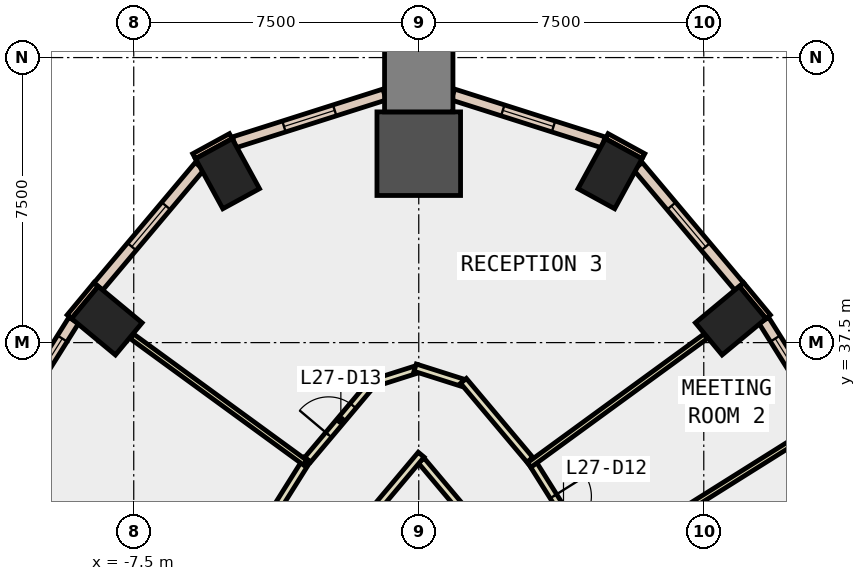
"""IFC4 building model, lengths in metres.
Left out: names, types, materials, properties, quantities, classifications, styles, units other than length and angle.
Written with IfcOpenShell. Run it as: python <this file> out.ifc"""

import sys

from ifc_helpers import new_model, si_unit, direction, frame, frame_2d, origin, origin_2d, place, context, subcontext, project, spatial, rectangle, extrude, element, fill, save


model = new_model("IFC4")
c1 = context("Model", 3, precision=1e-05, world=origin(), true_north=direction((0.0, 1.0)))
c2 = subcontext(c1, "Body", "Model", "MODEL_VIEW")
j1 = project(units=[si_unit("LENGTHUNIT", "METRE"), si_unit("PLANEANGLEUNIT", "RADIAN")], contexts=[c1])
p1 = place(None, origin())
s1 = spatial("IfcSite", under=j1, at=p1, CompositionType="ELEMENT")
p2 = place(p1, origin())
s2 = spatial("IfcBuilding", under=s1, at=p2, CompositionType="ELEMENT")
p3 = place(p2, frame((0.0, 0.0, 124.4)))
s3 = spatial("IfcBuildingStorey", under=s2, at=p3, CompositionType="ELEMENT", Elevation=124.4)
for number, where, z_axis, x_axis in (
    (1, (8.208, 38.077, -0.4), (0.0, 0.0, 1.0), (-0.638, 0.77, 0.0)),
    (2, (5.033, 41.944, -0.4), (0.0, 0.0, 1.0), (-0.877, 0.48, 0.0)),
):
    element("IfcColumn", number, at=place(p3, frame(where, z_axis=z_axis, x_axis=x_axis)), inside=s3, PredefinedType="COLUMN", context=c2, shape_type="SweptSolid", body=[
        extrude(rectangle(XDim=1.1, YDim=1.5, at=origin_2d()), origin(), (0.0, 0.0, 1.0), 4.2),
    ])
p4 = place(p3, frame((0.0, 42.471, -0.4), z_axis=(0.0, 0.0, 1.0), x_axis=(0.0, 1.0, 0.0)))
e3 = element("IfcColumn", 3, at=p4, inside=s3, PredefinedType="COLUMN", context=c2, shape_type="SweptSolid", body=[
    extrude(rectangle(XDim=2.2, YDim=2.2, at=origin_2d()), origin(), (0.0, 0.0, 1.0), 4.2),
])
for number, where, z_axis, x_axis in (
    (4, (-5.033, 41.944, -0.4), (0.0, 0.0, 1.0), (0.877, 0.48, 0.0)),
    (5, (-8.208, 38.077, -0.4), (0.0, 0.0, 1.0), (0.638, 0.77, 0.0)),
):
    element("IfcColumn", number, at=place(p3, frame(where, z_axis=z_axis, x_axis=x_axis)), inside=s3, PredefinedType="COLUMN", context=c2, shape_type="SweptSolid", body=[
        extrude(rectangle(XDim=1.1, YDim=1.5, at=origin_2d()), origin(), (0.0, 0.0, 1.0), 4.2),
    ])
p5 = place(p3, frame((0.0, 44.471, -0.4), z_axis=(0.0, 0.0, 1.0), x_axis=(0.0, 1.0, 0.0)))
e6 = element("IfcColumn", 6, at=p5, inside=s3, PredefinedType="COLUMN", context=c2, shape_type="SweptSolid", body=[
    extrude(rectangle(XDim=1.8, YDim=1.8, at=origin_2d()), origin(), (0.0, 0.0, 1.0), 4.2),
])
for number, where, z_axis, x_axis in (
    (7, (5.912, 42.404, 0.0), (0.0, 0.0, 1.0), (-0.878, 0.479, 0.0)),
    (8, (-4.946, 42.932, 0.0), (0.0, 0.0, 1.0), (-0.878, -0.479, 0.0)),
):
    element("IfcWall", number, at=place(p3, frame(where, z_axis=z_axis, x_axis=x_axis)), inside=s3, PredefinedType="STANDARD", context=c2, shape_type="SweptSolid", body=[
        extrude(rectangle(XDim=1.101, YDim=0.15, at=frame_2d((0.55, 0.0))), origin(), (0.0, 0.0, 1.0), 3.8),
    ])
for number, where, z_axis, x_axis in (
    (9, (9.194, 38.181, 0.0), (0.0, 0.0, 1.0), (-0.639, 0.77, 0.0)),
    (10, (-8.492, 39.027, 0.0), (0.0, 0.0, 1.0), (-0.639, -0.77, 0.0)),
):
    element("IfcWall", number, at=place(p3, frame(where, z_axis=z_axis, x_axis=x_axis)), inside=s3, PredefinedType="STANDARD", context=c2, shape_type="SweptSolid", body=[
        extrude(rectangle(XDim=1.1, YDim=0.15, at=frame_2d((0.55, 0.0))), origin(), (0.0, 0.0, 1.0), 3.8),
    ])
p6 = place(p3, frame((12.41, 32.779, 0.0), z_axis=(0.0, 0.0, 1.0), x_axis=(-0.53160564075, 0.846991996847, 0.0)))
e11 = element("IfcWall", 11, at=p6, inside=s3, PredefinedType="STANDARD", context=c2, shape_type="SweptSolid", body=[
    extrude(rectangle(XDim=6.266, YDim=0.3, at=frame_2d((3.133, 0.0))), origin(), (0.0, 0.0, 1.0), 3.8),
])
p7 = place(p6, frame((0.566, 0.0, 0.9)))
e12 = element("IfcOpeningElement", 12, at=p7, cuts=e11, PredefinedType="OPENING", context=c2, shape_type="SweptSolid", body=[
    extrude(rectangle(XDim=2.0, YDim=2.6, at=frame_2d((1.0, 1.3))), frame((0.0, 0.16, 0.0), z_axis=(0.0, -1.0, 0.0), x_axis=(1.0, 0.0, 0.0)), (0.0, 0.0, 1.0), 0.32),
])
p8 = place(p6, frame((3.699, 0.0, 0.9)))
e13 = element("IfcOpeningElement", 13, at=p8, cuts=e11, PredefinedType="OPENING", context=c2, shape_type="SweptSolid", body=[
    extrude(rectangle(XDim=2.0, YDim=2.6, at=frame_2d((1.0, 1.3))), frame((0.0, 0.16, 0.0), z_axis=(0.0, -1.0, 0.0), x_axis=(1.0, 0.0, 0.0)), (0.0, 0.0, 1.0), 0.32),
])
p9 = place(p3, frame((8.432, 38.976, 0.0), z_axis=(0.0, 0.0, 1.0), x_axis=(-0.643948600943, 0.765068754652, 0.0)))
e14 = element("IfcWall", 14, at=p9, inside=s3, PredefinedType="STANDARD", context=c2, shape_type="SweptSolid", body=[
    extrude(rectangle(XDim=4.138, YDim=0.3, at=frame_2d((2.069, 0.0))), origin(), (0.0, 0.0, 1.0), 3.8),
])
p10 = place(p9, frame((1.369, 0.0, 0.9)))
e15 = element("IfcOpeningElement", 15, at=p10, cuts=e14, PredefinedType="OPENING", context=c2, shape_type="SweptSolid", body=[
    extrude(rectangle(XDim=1.4, YDim=2.6, at=frame_2d((0.7, 1.3))), frame((0.0, 0.16, 0.0), z_axis=(0.0, -1.0, 0.0), x_axis=(1.0, 0.0, 0.0)), (0.0, 0.0, 1.0), 0.32),
])
p11 = place(p3, frame((4.859, 42.769, 0.0), z_axis=(0.0, 0.0, 1.0), x_axis=(-0.952992117398, 0.30299508936, 0.0)))
e16 = element("IfcWall", 16, at=p11, inside=s3, PredefinedType="STANDARD", context=c2, shape_type="SweptSolid", body=[
    extrude(rectangle(XDim=4.155, YDim=0.3, at=frame_2d((2.078, 0.0))), origin(), (0.0, 0.0, 1.0), 3.8),
])
p12 = place(p11, frame((1.378, 0.0, 0.9)))
e17 = element("IfcOpeningElement", 17, at=p12, cuts=e16, PredefinedType="OPENING", context=c2, shape_type="SweptSolid", body=[
    extrude(rectangle(XDim=1.4, YDim=2.6, at=frame_2d((0.7, 1.3))), frame((0.0, 0.16, 0.0), z_axis=(0.0, -1.0, 0.0), x_axis=(1.0, 0.0, 0.0)), (0.0, 0.0, 1.0), 0.32),
])
p13 = place(p3, frame((-0.899, 44.028, 0.0), z_axis=(0.0, 0.0, 1.0), x_axis=(-0.952992117398, -0.30299508936, 0.0)))
e18 = element("IfcWall", 18, at=p13, inside=s3, PredefinedType="STANDARD", context=c2, shape_type="SweptSolid", body=[
    extrude(rectangle(XDim=4.155, YDim=0.3, at=frame_2d((2.078, 0.0))), origin(), (0.0, 0.0, 1.0), 3.8),
])
p14 = place(p13, frame((1.378, 0.0, 0.9)))
e19 = element("IfcOpeningElement", 19, at=p14, cuts=e18, PredefinedType="OPENING", context=c2, shape_type="SweptSolid", body=[
    extrude(rectangle(XDim=1.4, YDim=2.6, at=frame_2d((0.7, 1.3))), frame((0.0, 0.16, 0.0), z_axis=(0.0, -1.0, 0.0), x_axis=(1.0, 0.0, 0.0)), (0.0, 0.0, 1.0), 0.32),
])
p15 = place(p3, frame((-5.767, 42.142, 0.0), z_axis=(0.0, 0.0, 1.0), x_axis=(-0.643948600943, -0.765068754652, 0.0)))
e20 = element("IfcWall", 20, at=p15, inside=s3, PredefinedType="STANDARD", context=c2, shape_type="SweptSolid", body=[
    extrude(rectangle(XDim=4.138, YDim=0.3, at=frame_2d((2.069, 0.0))), origin(), (0.0, 0.0, 1.0), 3.8),
])
p16 = place(p15, frame((1.369, 0.0, 0.9)))
e21 = element("IfcOpeningElement", 21, at=p16, cuts=e20, PredefinedType="OPENING", context=c2, shape_type="SweptSolid", body=[
    extrude(rectangle(XDim=1.4, YDim=2.6, at=frame_2d((0.7, 1.3))), frame((0.0, 0.16, 0.0), z_axis=(0.0, -1.0, 0.0), x_axis=(1.0, 0.0, 0.0)), (0.0, 0.0, 1.0), 0.32),
])
p17 = place(p3, frame((-9.079, 38.086, 0.0), z_axis=(0.0, 0.0, 1.0), x_axis=(-0.53160564075, -0.846991996847, 0.0)))
e22 = element("IfcWall", 22, at=p17, inside=s3, PredefinedType="STANDARD", context=c2, shape_type="SweptSolid", body=[
    extrude(rectangle(XDim=6.266, YDim=0.3, at=frame_2d((3.133, 0.0))), origin(), (0.0, 0.0, 1.0), 3.8),
])
p18 = place(p17, frame((0.566, 0.0, 0.9)))
e23 = element("IfcOpeningElement", 23, at=p18, cuts=e22, PredefinedType="OPENING", context=c2, shape_type="SweptSolid", body=[
    extrude(rectangle(XDim=2.0, YDim=2.6, at=frame_2d((1.0, 1.3))), frame((0.0, 0.16, 0.0), z_axis=(0.0, -1.0, 0.0), x_axis=(1.0, 0.0, 0.0)), (0.0, 0.0, 1.0), 0.32),
])
p19 = place(p17, frame((3.699, 0.0, 0.9)))
e24 = element("IfcOpeningElement", 24, at=p19, cuts=e22, PredefinedType="OPENING", context=c2, shape_type="SweptSolid", body=[
    extrude(rectangle(XDim=2.0, YDim=2.6, at=frame_2d((1.0, 1.3))), frame((0.0, 0.16, 0.0), z_axis=(0.0, -1.0, 0.0), x_axis=(1.0, 0.0, 0.0)), (0.0, 0.0, 1.0), 0.32),
])
p20 = place(p3, frame((1.271, 32.964, 0.0), z_axis=(0.0, 0.0, 1.0), x_axis=(-0.644007376392, 0.765019280249, 0.0)))
e25 = element("IfcWall", 25, at=p20, inside=s3, PredefinedType="PARTITIONING", context=c2, shape_type="SweptSolid", body=[
    extrude(rectangle(XDim=1.874, YDim=0.2, at=frame_2d((0.937, 0.0))), origin(), (0.0, 0.0, 1.0), 3.8),
])
p21 = place(p3, frame((0.064, 34.551, 0.0), z_axis=(0.0, 0.0, 1.0), x_axis=(-0.643638095982, -0.765329995101, 0.0)))
e26 = element("IfcWall", 26, at=p21, inside=s3, PredefinedType="PARTITIONING", context=c2, shape_type="SweptSolid", body=[
    extrude(rectangle(XDim=1.874, YDim=0.2, at=frame_2d((0.937, 0.0))), origin(), (0.0, 0.0, 1.0), 3.8),
])
p22 = place(p3, frame((2.975, 34.361, 0.0), z_axis=(0.0, 0.0, 1.0), x_axis=(0.531740854333, -0.846907116414, 0.0)))
e27 = element("IfcWall", 27, at=p22, inside=s3, PredefinedType="PARTITIONING", context=c2, shape_type="SweptSolid", body=[
    extrude(rectangle(XDim=3.135, YDim=0.2, at=frame_2d((1.567, 0.0))), origin(), (0.0, 0.0, 1.0), 3.8),
])
p23 = place(p22, frame((1.068, 0.0, 0.0)))
e28 = element("IfcOpeningElement", 28, at=p23, cuts=e27, PredefinedType="OPENING", context=c2, shape_type="SweptSolid", body=[
    extrude(rectangle(XDim=1.0, YDim=2.1, at=frame_2d((0.5, 1.05))), frame((0.0, 0.11, 0.0), z_axis=(0.0, -1.0, 0.0), x_axis=(1.0, 0.0, 0.0)), (0.0, 0.0, 1.0), 0.22),
])
p24 = place(p3, frame((-2.924, 34.417, 0.0), z_axis=(0.0, 0.0, 1.0), x_axis=(0.644113583568, 0.764929860486, 0.0)))
e29 = element("IfcWall", 29, at=p24, inside=s3, PredefinedType="PARTITIONING", context=c2, shape_type="SweptSolid", body=[
    extrude(rectangle(XDim=2.714, YDim=0.2, at=frame_2d((1.357, 0.0))), origin(), (0.0, 0.0, 1.0), 3.8),
])
p25 = place(p24, frame((0.857, 0.0, 0.0)))
e30 = element("IfcOpeningElement", 30, at=p25, cuts=e29, PredefinedType="OPENING", context=c2, shape_type="SweptSolid", body=[
    extrude(rectangle(XDim=1.0, YDim=2.1, at=frame_2d((0.5, 1.05))), frame((0.0, 0.11, 0.0), z_axis=(0.0, -1.0, 0.0), x_axis=(1.0, 0.0, 0.0)), (0.0, 0.0, 1.0), 0.22),
])
p26 = place(p3, frame((-1.145, 36.447, 0.0), z_axis=(0.0, 0.0, 1.0), x_axis=(0.952957783381, 0.303103056886, 0.0)))
e31 = element("IfcWall", 31, at=p26, inside=s3, PredefinedType="PARTITIONING", context=c2, shape_type="SweptSolid", body=[
    extrude(rectangle(XDim=1.102, YDim=0.2, at=frame_2d((0.551, 0.0))), origin(), (0.0, 0.0, 1.0), 3.8),
])
p27 = place(p3, frame((-0.095, 36.841, 0.0), z_axis=(0.0, 0.0, 1.0), x_axis=(0.953036611979, -0.302855107646, 0.0)))
e32 = element("IfcWall", 32, at=p27, inside=s3, PredefinedType="PARTITIONING", context=c2, shape_type="SweptSolid", body=[
    extrude(rectangle(XDim=1.301, YDim=0.2, at=frame_2d((0.65, 0.0))), origin(), (0.0, 0.0, 1.0), 3.8),
])
p28 = place(p3, frame((1.176, 36.493, 0.0), z_axis=(0.0, 0.0, 1.0), x_axis=(0.644113583568, -0.764929860486, 0.0)))
e33 = element("IfcWall", 33, at=p28, inside=s3, PredefinedType="PARTITIONING", context=c2, shape_type="SweptSolid", body=[
    extrude(rectangle(XDim=2.714, YDim=0.2, at=frame_2d((1.357, 0.0))), origin(), (0.0, 0.0, 1.0), 3.8),
])
p29 = place(p3, frame((-6.626, 28.546, 0.0), z_axis=(0.0, 0.0, 1.0), x_axis=(0.531701842465, 0.846931609234, 0.0)))
e34 = element("IfcWall", 34, at=p29, inside=s3, PredefinedType="PARTITIONING", context=c2, shape_type="SweptSolid", body=[
    extrude(rectangle(XDim=6.942, YDim=0.2, at=frame_2d((3.471, 0.0))), origin(), (0.0, 0.0, 1.0), 3.8),
])
p30 = place(p3, frame((4.597, 31.589, 0.0), z_axis=(0.0, 0.0, 1.0), x_axis=(0.846980720953, 0.531623605885, 0.0)))
e35 = element("IfcWall", 35, at=p30, inside=s3, PredefinedType="PARTITIONING", context=c2, shape_type="SweptSolid", body=[
    extrude(rectangle(XDim=7.101, YDim=0.15, at=frame_2d((3.55, 0.0))), origin(), (0.0, 0.0, 1.0), 3.8),
])
p31 = place(p3, frame((2.908, 34.281, 0.0), z_axis=(0.0, 0.0, 1.0), x_axis=(0.807935867, 0.589270425879, 0.0)))
e36 = element("IfcWall", 36, at=p31, inside=s3, PredefinedType="PARTITIONING", context=c2, shape_type="SweptSolid", body=[
    extrude(rectangle(XDim=5.744, YDim=0.15, at=frame_2d((2.872, 0.0))), origin(), (0.0, 0.0, 1.0), 3.8),
])
p32 = place(p3, frame((-2.989, 34.34, 0.0), z_axis=(0.0, 0.0, 1.0), x_axis=(-0.807932877043, 0.589274525322, 0.0)))
e37 = element("IfcWall", 37, at=p32, inside=s3, PredefinedType="PARTITIONING", context=c2, shape_type="SweptSolid", body=[
    extrude(rectangle(XDim=5.644, YDim=0.15, at=frame_2d((2.822, 0.0))), origin(), (0.0, 0.0, 1.0), 3.8),
])
p33 = place(p8, origin())
e38 = element("IfcWindow", 38, at=p33, inside=s3, PartitioningType="SINGLE_PANEL", PredefinedType="WINDOW", context=c2, shape_type="SweptSolid", body=[
    extrude(rectangle(XDim=2.0, YDim=2.6, at=frame_2d((1.0, 1.3))), frame((0.0, 0.03, 0.0), z_axis=(0.0, -1.0, 0.0), x_axis=(1.0, 0.0, 0.0)), (0.0, 0.0, 1.0), 0.06),
])
fill(e13, e38)
p34 = place(p10, origin())
e39 = element("IfcWindow", 39, at=p34, inside=s3, PartitioningType="SINGLE_PANEL", PredefinedType="WINDOW", context=c2, shape_type="SweptSolid", body=[
    extrude(rectangle(XDim=1.4, YDim=2.6, at=frame_2d((0.7, 1.3))), frame((0.0, 0.03, 0.0), z_axis=(0.0, -1.0, 0.0), x_axis=(1.0, 0.0, 0.0)), (0.0, 0.0, 1.0), 0.06),
])
fill(e15, e39)
p35 = place(p12, origin())
e40 = element("IfcWindow", 40, at=p35, inside=s3, PartitioningType="SINGLE_PANEL", PredefinedType="WINDOW", context=c2, shape_type="SweptSolid", body=[
    extrude(rectangle(XDim=1.4, YDim=2.6, at=frame_2d((0.7, 1.3))), frame((0.0, 0.03, 0.0), z_axis=(0.0, -1.0, 0.0), x_axis=(1.0, 0.0, 0.0)), (0.0, 0.0, 1.0), 0.06),
])
fill(e17, e40)
p36 = place(p14, origin())
e41 = element("IfcWindow", 41, at=p36, inside=s3, PartitioningType="SINGLE_PANEL", PredefinedType="WINDOW", context=c2, shape_type="SweptSolid", body=[
    extrude(rectangle(XDim=1.4, YDim=2.6, at=frame_2d((0.7, 1.3))), frame((0.0, 0.03, 0.0), z_axis=(0.0, -1.0, 0.0), x_axis=(1.0, 0.0, 0.0)), (0.0, 0.0, 1.0), 0.06),
])
fill(e19, e41)
p37 = place(p16, origin())
e42 = element("IfcWindow", 42, at=p37, inside=s3, PartitioningType="SINGLE_PANEL", PredefinedType="WINDOW", context=c2, shape_type="SweptSolid", body=[
    extrude(rectangle(XDim=1.4, YDim=2.6, at=frame_2d((0.7, 1.3))), frame((0.0, 0.03, 0.0), z_axis=(0.0, -1.0, 0.0), x_axis=(1.0, 0.0, 0.0)), (0.0, 0.0, 1.0), 0.06),
])
fill(e21, e42)
p38 = place(p18, origin())
e43 = element("IfcWindow", 43, at=p38, inside=s3, PartitioningType="SINGLE_PANEL", PredefinedType="WINDOW", context=c2, shape_type="SweptSolid", body=[
    extrude(rectangle(XDim=2.0, YDim=2.6, at=frame_2d((1.0, 1.3))), frame((0.0, 0.03, 0.0), z_axis=(0.0, -1.0, 0.0), x_axis=(1.0, 0.0, 0.0)), (0.0, 0.0, 1.0), 0.06),
])
fill(e23, e43)
p39 = place(p23, origin())
e44 = element("IfcDoor", 44, at=p39, inside=s3, OperationType="SINGLE_SWING_LEFT", PredefinedType="DOOR", context=c2, shape_type="SweptSolid", body=[
    extrude(rectangle(XDim=1.0, YDim=2.1, at=frame_2d((0.5, 1.05))), frame((0.0, 0.025, 0.0), z_axis=(0.0, -1.0, 0.0), x_axis=(1.0, 0.0, 0.0)), (0.0, 0.0, 1.0), 0.05),
])
fill(e28, e44)
p40 = place(p25, origin())
e45 = element("IfcDoor", 45, at=p40, inside=s3, OperationType="SINGLE_SWING_LEFT", PredefinedType="DOOR", context=c2, shape_type="SweptSolid", body=[
    extrude(rectangle(XDim=1.0, YDim=2.1, at=frame_2d((0.5, 1.05))), frame((0.0, 0.025, 0.0), z_axis=(0.0, -1.0, 0.0), x_axis=(1.0, 0.0, 0.0)), (0.0, 0.0, 1.0), 0.05),
])
fill(e30, e45)
save(model, sys.argv[1])
